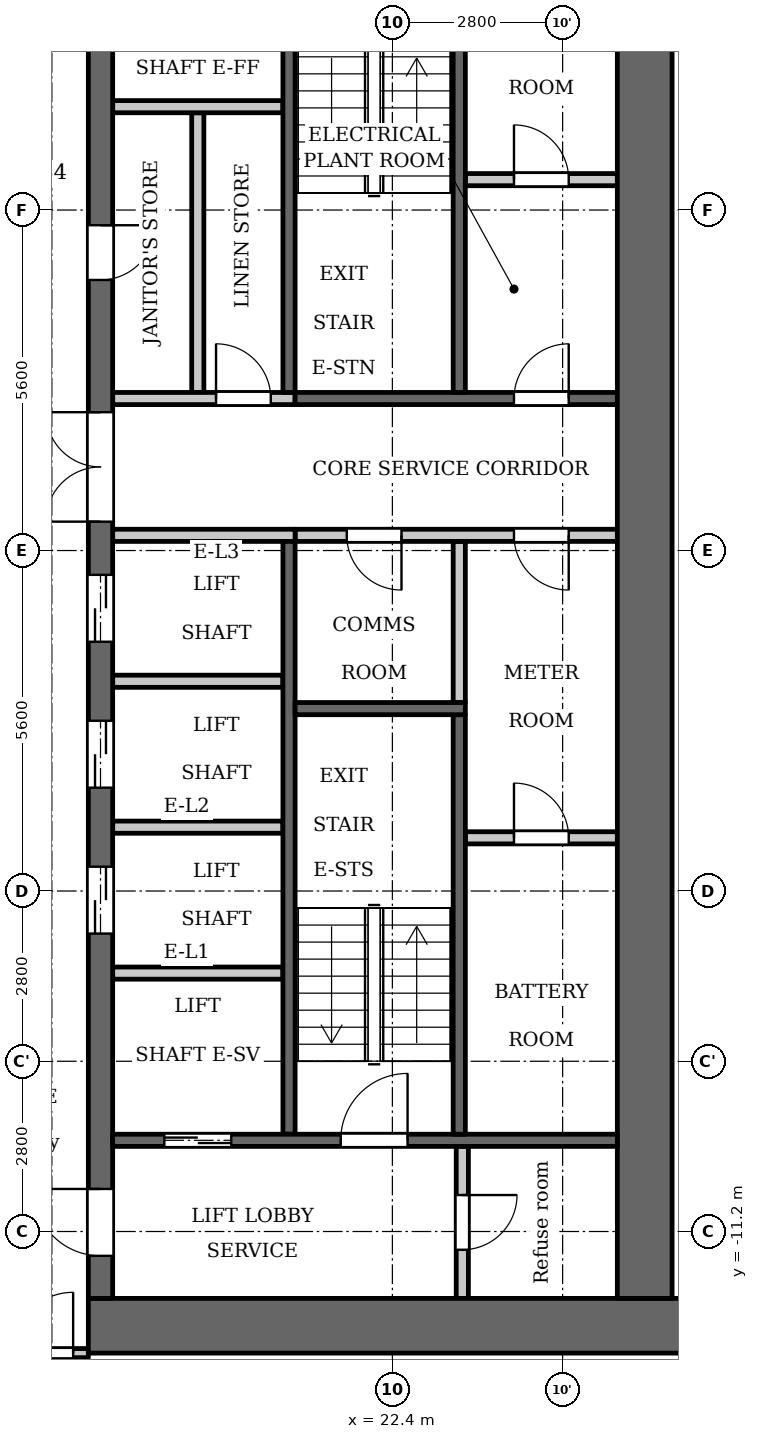
"""IFC4 building model, lengths in metres.
Left out: names, types, materials, properties, quantities, classifications, styles, units other than length and angle.
Written with IfcOpenShell. Run it as: python <this file> out.ifc"""

import sys

from ifc_helpers import new_model, si_unit, direction, frame, frame_2d, origin, place, context, subcontext, project, spatial, rectangle, extrude, element, fill, save


model = new_model("IFC4")
c1 = context("Model", 3, precision=1e-05, world=origin(), true_north=direction((0.0, 1.0)))
c2 = subcontext(c1, "Body", "Model", "MODEL_VIEW")
j1 = project(units=[si_unit("LENGTHUNIT", "METRE"), si_unit("PLANEANGLEUNIT", "RADIAN")], contexts=[c1])
p1 = place(None, origin())
s1 = spatial("IfcSite", under=j1, at=p1, CompositionType="ELEMENT")
p2 = place(p1, origin())
s2 = spatial("IfcBuilding", under=s1, at=p2, CompositionType="ELEMENT")
p3 = place(p2, frame((0.0, 0.0, 118.3)))
s3 = spatial("IfcBuildingStorey", under=s2, at=p3, CompositionType="ELEMENT", Elevation=118.3)
p4 = place(p3, frame((23.5, -2.5, 0.0), z_axis=(0.0, 0.0, 1.0), x_axis=(0.0, 1.0, 0.0)))
e1 = element("IfcWall", 1, at=p4, inside=s3, PredefinedType="PARTITIONING", context=c2, shape_type="SweptSolid", body=[
    extrude(rectangle(XDim=2.65, YDim=0.2, at=frame_2d((1.325, 0.0))), origin(), (0.0, 0.0, 1.0), 3.2),
])
p5 = place(p3, frame((20.7, 2.6, 0.0), z_axis=(0.0, 0.0, 1.0), x_axis=(0.0, 1.0, 0.0)))
e2 = element("IfcWall", 2, at=p5, inside=s3, PredefinedType="SHEAR", context=c2, shape_type="SweptSolid", body=[
    extrude(rectangle(XDim=7.0, YDim=0.2, at=frame_2d((3.5, 0.0))), origin(), (0.0, 0.0, 1.0), 3.2),
])
p6 = place(p3, frame((20.7, -9.6, 0.0), z_axis=(0.0, 0.0, 1.0), x_axis=(0.0, 1.0, 0.0)))
e3 = element("IfcWall", 3, at=p6, inside=s3, PredefinedType="SHEAR", context=c2, shape_type="SweptSolid", body=[
    extrude(rectangle(XDim=9.75, YDim=0.2, at=frame_2d((4.875, 0.0))), origin(), (0.0, 0.0, 1.0), 3.2),
])
p7 = place(p3, frame((20.8, 2.5, 0.0), z_axis=(0.0, 0.0, 1.0), x_axis=(1.0, 0.0, 0.0)))
e4 = element("IfcWall", 4, at=p7, inside=s3, PredefinedType="SHEAR", context=c2, shape_type="SweptSolid", body=[
    extrude(rectangle(XDim=5.3, YDim=0.2, at=frame_2d((2.65, 0.0))), origin(), (0.0, 0.0, 1.0), 3.2),
])
p8 = place(p7, frame((3.6, 0.0, 0.0)))
e5 = element("IfcOpeningElement", 5, at=p8, cuts=e4, PredefinedType="OPENING", context=c2, shape_type="SweptSolid", body=[
    extrude(rectangle(XDim=0.9, YDim=2.1, at=frame_2d((0.45, 1.05))), frame((0.0, 0.11, 0.0), z_axis=(0.0, -1.0, 0.0), x_axis=(1.0, 0.0, 0.0)), (0.0, 0.0, 1.0), 0.22),
])
p9 = place(p3, frame((20.8, 0.25, 0.0), z_axis=(0.0, 0.0, 1.0), x_axis=(1.0, 0.0, 0.0)))
e6 = element("IfcWall", 6, at=p9, inside=s3, PredefinedType="PARTITIONING", context=c2, shape_type="SweptSolid", body=[
    extrude(rectangle(XDim=5.3, YDim=0.2, at=frame_2d((2.65, 0.0))), origin(), (0.0, 0.0, 1.0), 3.2),
])
p10 = place(p9, frame((0.85, 0.0, 0.0)))
e7 = element("IfcOpeningElement", 7, at=p10, cuts=e6, PredefinedType="OPENING", context=c2, shape_type="SweptSolid", body=[
    extrude(rectangle(XDim=0.9, YDim=2.1, at=frame_2d((0.45, 1.05))), frame((0.0, 0.11, 0.0), z_axis=(0.0, -1.0, 0.0), x_axis=(1.0, 0.0, 0.0)), (0.0, 0.0, 1.0), 0.22),
])
p11 = place(p9, frame((3.6, 0.0, 0.0)))
e8 = element("IfcOpeningElement", 8, at=p11, cuts=e6, PredefinedType="OPENING", context=c2, shape_type="SweptSolid", body=[
    extrude(rectangle(XDim=0.9, YDim=2.1, at=frame_2d((0.45, 1.05))), frame((0.0, 0.11, 0.0), z_axis=(0.0, -1.0, 0.0), x_axis=(1.0, 0.0, 0.0)), (0.0, 0.0, 1.0), 0.22),
])
p12 = place(p3, frame((17.4, -12.75, 0.0), z_axis=(0.0, 0.0, 1.0), x_axis=(1.0, 0.0, 0.0)))
e9 = element("IfcWall", 9, at=p12, inside=s3, PredefinedType="SHEAR", context=c2, shape_type="SweptSolid", body=[
    extrude(rectangle(XDim=10.4, YDim=0.9, at=frame_2d((5.2, 0.0))), origin(), (0.0, 0.0, 1.0), 3.2),
])
p13 = place(p3, frame((19.2, 2.6, 0.0), z_axis=(0.0, 0.0, 1.0), x_axis=(0.0, 1.0, 0.0)))
e10 = element("IfcWall", 10, at=p13, inside=s3, PredefinedType="PARTITIONING", context=c2, shape_type="SweptSolid", body=[
    extrude(rectangle(XDim=4.6, YDim=0.2, at=frame_2d((2.3, 0.0))), origin(), (0.0, 0.0, 1.0), 3.2),
])
p14 = place(p3, frame((17.6, -12.3, 0.0), z_axis=(0.0, 0.0, 1.0), x_axis=(0.0, 1.0, 0.0)))
e11 = element("IfcWall", 11, at=p14, inside=s3, PredefinedType="SHEAR", context=c2, shape_type="SweptSolid", body=[
    extrude(rectangle(XDim=24.6, YDim=0.4, at=frame_2d((12.3, 0.0))), origin(), (0.0, 0.0, 1.0), 3.2),
])
p15 = place(p14, frame((6.0, 0.0, 0.0)))
e12 = element("IfcOpeningElement", 12, at=p15, cuts=e11, PredefinedType="OPENING", context=c2, shape_type="SweptSolid", body=[
    extrude(rectangle(XDim=1.1, YDim=2.1, at=frame_2d((0.55, 1.05))), frame((0.0, 0.21, 0.0), z_axis=(0.0, -1.0, 0.0), x_axis=(1.0, 0.0, 0.0)), (0.0, 0.0, 1.0), 0.42),
])
p16 = place(p14, frame((8.4, 0.0, 0.0)))
e13 = element("IfcOpeningElement", 13, at=p16, cuts=e11, PredefinedType="OPENING", context=c2, shape_type="SweptSolid", body=[
    extrude(rectangle(XDim=1.1, YDim=2.1, at=frame_2d((0.55, 1.05))), frame((0.0, 0.21, 0.0), z_axis=(0.0, -1.0, 0.0), x_axis=(1.0, 0.0, 0.0)), (0.0, 0.0, 1.0), 0.42),
])
p17 = place(p14, frame((10.8, 0.0, 0.0)))
e14 = element("IfcOpeningElement", 14, at=p17, cuts=e11, PredefinedType="OPENING", context=c2, shape_type="SweptSolid", body=[
    extrude(rectangle(XDim=1.1, YDim=2.1, at=frame_2d((0.55, 1.05))), frame((0.0, 0.21, 0.0), z_axis=(0.0, -1.0, 0.0), x_axis=(1.0, 0.0, 0.0)), (0.0, 0.0, 1.0), 0.42),
])
p18 = place(p14, frame((16.75, 0.0, 0.0)))
e15 = element("IfcOpeningElement", 15, at=p18, cuts=e11, PredefinedType="OPENING", context=c2, shape_type="SweptSolid", body=[
    extrude(rectangle(XDim=0.9, YDim=2.1, at=frame_2d((0.45, 1.05))), frame((0.0, 0.21, 0.0), z_axis=(0.0, -1.0, 0.0), x_axis=(1.0, 0.0, 0.0)), (0.0, 0.0, 1.0), 0.42),
])
p19 = place(p14, frame((22.8, 0.0, 0.0)))
e16 = element("IfcOpeningElement", 16, at=p19, cuts=e11, PredefinedType="OPENING", context=c2, shape_type="SweptSolid", body=[
    extrude(rectangle(XDim=1.1, YDim=2.1, at=frame_2d((0.55, 1.05))), frame((0.0, 0.21, 0.0), z_axis=(0.0, -1.0, 0.0), x_axis=(1.0, 0.0, 0.0)), (0.0, 0.0, 1.0), 0.42),
])
p20 = place(p14, frame((0.7, 0.0, 0.0)))
e17 = element("IfcOpeningElement", 17, at=p20, cuts=e11, PredefinedType="OPENING", context=c2, shape_type="SweptSolid", body=[
    extrude(rectangle(XDim=1.1, YDim=2.1, at=frame_2d((0.55, 1.05))), frame((0.0, 0.21, 0.0), z_axis=(0.0, -1.0, 0.0), x_axis=(1.0, 0.0, 0.0)), (0.0, 0.0, 1.0), 0.42),
])
p21 = place(p14, frame((12.775, 0.0, 0.0)))
e18 = element("IfcOpeningElement", 18, at=p21, cuts=e11, PredefinedType="OPENING", context=c2, shape_type="SweptSolid", body=[
    extrude(rectangle(XDim=1.8, YDim=2.1, at=frame_2d((0.9, 1.05))), frame((0.0, 0.21, 0.0), z_axis=(0.0, -1.0, 0.0), x_axis=(1.0, 0.0, 0.0)), (0.0, 0.0, 1.0), 0.42),
])
p22 = place(p3, frame((26.55, -12.3, 0.0), z_axis=(0.0, 0.0, 1.0), x_axis=(0.0, 1.0, 0.0)))
e19 = element("IfcWall", 19, at=p22, inside=s3, PredefinedType="SHEAR", context=c2, shape_type="SweptSolid", body=[
    extrude(rectangle(XDim=24.6, YDim=0.9, at=frame_2d((12.3, 0.0))), origin(), (0.0, 0.0, 1.0), 3.2),
])
p23 = place(p3, frame((23.55, -12.3, 0.0), z_axis=(0.0, 0.0, 1.0), x_axis=(0.0, 1.0, 0.0)))
e20 = element("IfcWall", 20, at=p23, inside=s3, PredefinedType="PARTITIONING", context=c2, shape_type="SweptSolid", body=[
    extrude(rectangle(XDim=2.5, YDim=0.2, at=frame_2d((1.25, 0.0))), origin(), (0.0, 0.0, 1.0), 3.2),
])
p24 = place(p23, frame((0.8, 0.0, 0.0)))
e21 = element("IfcOpeningElement", 21, at=p24, cuts=e20, PredefinedType="OPENING", context=c2, shape_type="SweptSolid", body=[
    extrude(rectangle(XDim=0.9, YDim=2.1, at=frame_2d((0.45, 1.05))), frame((0.0, 0.11, 0.0), z_axis=(0.0, -1.0, 0.0), x_axis=(1.0, 0.0, 0.0)), (0.0, 0.0, 1.0), 0.22),
])
p25 = place(p3, frame((23.6, -4.725, 0.0), z_axis=(0.0, 0.0, 1.0), x_axis=(1.0, 0.0, 0.0)))
e22 = element("IfcWall", 22, at=p25, inside=s3, PredefinedType="PARTITIONING", context=c2, shape_type="SweptSolid", body=[
    extrude(rectangle(XDim=2.5, YDim=0.2, at=frame_2d((1.25, 0.0))), origin(), (0.0, 0.0, 1.0), 3.2),
])
p26 = place(p25, frame((0.8, 0.0, 0.0)))
e23 = element("IfcOpeningElement", 23, at=p26, cuts=e22, PredefinedType="OPENING", context=c2, shape_type="SweptSolid", body=[
    extrude(rectangle(XDim=0.9, YDim=2.1, at=frame_2d((0.45, 1.05))), frame((0.0, 0.11, 0.0), z_axis=(0.0, -1.0, 0.0), x_axis=(1.0, 0.0, 0.0)), (0.0, 0.0, 1.0), 0.22),
])
p27 = place(p3, frame((23.6, 6.1, 0.0), z_axis=(0.0, 0.0, 1.0), x_axis=(1.0, 0.0, 0.0)))
e24 = element("IfcWall", 24, at=p27, inside=s3, PredefinedType="PARTITIONING", context=c2, shape_type="SweptSolid", body=[
    extrude(rectangle(XDim=2.5, YDim=0.2, at=frame_2d((1.25, 0.0))), origin(), (0.0, 0.0, 1.0), 3.2),
])
p28 = place(p27, frame((0.8, 0.0, 0.0)))
e25 = element("IfcOpeningElement", 25, at=p28, cuts=e24, PredefinedType="OPENING", context=c2, shape_type="SweptSolid", body=[
    extrude(rectangle(XDim=0.9, YDim=2.1, at=frame_2d((0.45, 1.05))), frame((0.0, 0.11, 0.0), z_axis=(0.0, -1.0, 0.0), x_axis=(1.0, 0.0, 0.0)), (0.0, 0.0, 1.0), 0.22),
])
p29 = place(p3, frame((17.8, -9.7, 0.0), z_axis=(0.0, 0.0, 1.0), x_axis=(1.0, 0.0, 0.0)))
e26 = element("IfcWall", 26, at=p29, inside=s3, PredefinedType="SHEAR", context=c2, shape_type="SweptSolid", body=[
    extrude(rectangle(XDim=8.3, YDim=0.2, at=frame_2d((4.15, 0.0))), origin(), (0.0, 0.0, 1.0), 3.2),
])
p30 = place(p29, frame((0.85, 0.0, 0.0)))
e27 = element("IfcOpeningElement", 27, at=p30, cuts=e26, PredefinedType="OPENING", context=c2, shape_type="SweptSolid", body=[
    extrude(rectangle(XDim=1.1, YDim=2.1, at=frame_2d((0.55, 1.05))), frame((0.0, 0.11, 0.0), z_axis=(0.0, -1.0, 0.0), x_axis=(1.0, 0.0, 0.0)), (0.0, 0.0, 1.0), 0.22),
])
p31 = place(p29, frame((3.75, 0.0, 0.0)))
e28 = element("IfcOpeningElement", 28, at=p31, cuts=e26, PredefinedType="OPENING", context=c2, shape_type="SweptSolid", body=[
    extrude(rectangle(XDim=1.1, YDim=2.1, at=frame_2d((0.55, 1.05))), frame((0.0, 0.11, 0.0), z_axis=(0.0, -1.0, 0.0), x_axis=(1.0, 0.0, 0.0)), (0.0, 0.0, 1.0), 0.22),
])
for number, where, z_axis, x_axis in (
    (29, (17.8, -6.95, 0.0), (0.0, 0.0, 1.0), (1.0, 0.0, 0.0)),
    (30, (17.8, -4.55, 0.0), (0.0, 0.0, 1.0), (1.0, 0.0, 0.0)),
    (31, (17.8, -2.15, 0.0), (0.0, 0.0, 1.0), (1.0, 0.0, 0.0)),
):
    element("IfcWall", number, at=place(p3, frame(where, z_axis=z_axis, x_axis=x_axis)), inside=s3, PredefinedType="PARTITIONING", context=c2, shape_type="SweptSolid", body=[
        extrude(rectangle(XDim=2.8, YDim=0.2, at=frame_2d((1.4, 0.0))), origin(), (0.0, 0.0, 1.0), 3.2),
    ])
p32 = place(p3, frame((17.8, 0.25, 0.0), z_axis=(0.0, 0.0, 1.0), x_axis=(1.0, 0.0, 0.0)))
e32 = element("IfcWall", 32, at=p32, inside=s3, PredefinedType="PARTITIONING", context=c2, shape_type="SweptSolid", body=[
    extrude(rectangle(XDim=3.0, YDim=0.2, at=frame_2d((1.5, 0.0))), origin(), (0.0, 0.0, 1.0), 3.2),
])
p33 = place(p3, frame((17.8, 2.5, 0.0), z_axis=(0.0, 0.0, 1.0), x_axis=(1.0, 0.0, 0.0)))
e33 = element("IfcWall", 33, at=p33, inside=s3, PredefinedType="PARTITIONING", context=c2, shape_type="SweptSolid", body=[
    extrude(rectangle(XDim=3.0, YDim=0.2, at=frame_2d((1.5, 0.0))), origin(), (0.0, 0.0, 1.0), 3.2),
])
p34 = place(p33, frame((1.7, 0.0, 0.0)))
e34 = element("IfcOpeningElement", 34, at=p34, cuts=e33, PredefinedType="OPENING", context=c2, shape_type="SweptSolid", body=[
    extrude(rectangle(XDim=0.9, YDim=2.1, at=frame_2d((0.45, 1.05))), frame((0.0, 0.11, 0.0), z_axis=(0.0, -1.0, 0.0), x_axis=(1.0, 0.0, 0.0)), (0.0, 0.0, 1.0), 0.22),
])
p35 = place(p3, frame((17.8, 7.3, 0.0), z_axis=(0.0, 0.0, 1.0), x_axis=(1.0, 0.0, 0.0)))
e35 = element("IfcWall", 35, at=p35, inside=s3, PredefinedType="PARTITIONING", context=c2, shape_type="SweptSolid", body=[
    extrude(rectangle(XDim=2.8, YDim=0.2, at=frame_2d((1.4, 0.0))), origin(), (0.0, 0.0, 1.0), 3.2),
])
p36 = place(p3, frame((23.5, 2.6, 0.0), z_axis=(0.0, 0.0, 1.0), x_axis=(0.0, 1.0, 0.0)))
e36 = element("IfcWall", 36, at=p36, inside=s3, PredefinedType="SHEAR", context=c2, shape_type="SweptSolid", body=[
    extrude(rectangle(XDim=7.0, YDim=0.2, at=frame_2d((3.5, 0.0))), origin(), (0.0, 0.0, 1.0), 3.2),
])
p37 = place(p3, frame((23.5, -9.6, 0.0), z_axis=(0.0, 0.0, 1.0), x_axis=(0.0, 1.0, 0.0)))
e37 = element("IfcWall", 37, at=p37, inside=s3, PredefinedType="SHEAR", context=c2, shape_type="SweptSolid", body=[
    extrude(rectangle(XDim=6.9, YDim=0.2, at=frame_2d((3.45, 0.0))), origin(), (0.0, 0.0, 1.0), 3.2),
])
p38 = place(p3, frame((20.8, -2.6, 0.0), z_axis=(0.0, 0.0, 1.0), x_axis=(1.0, 0.0, 0.0)))
e38 = element("IfcWall", 38, at=p38, inside=s3, PredefinedType="SHEAR", context=c2, shape_type="SweptSolid", body=[
    extrude(rectangle(XDim=2.8, YDim=0.2, at=frame_2d((1.4, 0.0))), origin(), (0.0, 0.0, 1.0), 3.2),
])
p39 = place(p3, frame((-17.4, -13.2, 0.0), z_axis=(0.0, 0.0, 1.0), x_axis=(1.0, 0.0, 0.0)))
e39 = element("IfcWall", 39, at=p39, inside=s3, PredefinedType="PARTITIONING", context=c2, shape_type="SweptSolid", body=[
    extrude(rectangle(XDim=34.8, YDim=0.15, at=frame_2d((17.4, 0.0))), origin(), (0.0, 0.0, 1.0), 3.2),
])
p40 = place(p39, frame((0.15, 0.0, 0.0)))
e40 = element("IfcOpeningElement", 40, at=p40, cuts=e39, PredefinedType="OPENING", context=c2, shape_type="SweptSolid", body=[
    extrude(rectangle(XDim=1.0, YDim=2.1, at=frame_2d((0.5, 1.05))), frame((0.0, 0.085, 0.0), z_axis=(0.0, -1.0, 0.0), x_axis=(1.0, 0.0, 0.0)), (0.0, 0.0, 1.0), 0.17),
])
p41 = place(p39, frame((33.55, 0.0, 0.0)))
e41 = element("IfcOpeningElement", 41, at=p41, cuts=e39, PredefinedType="OPENING", context=c2, shape_type="SweptSolid", body=[
    extrude(rectangle(XDim=1.0, YDim=2.1, at=frame_2d((0.5, 1.05))), frame((0.0, 0.085, 0.0), z_axis=(0.0, -1.0, 0.0), x_axis=(1.0, 0.0, 0.0)), (0.0, 0.0, 1.0), 0.17),
])
p42 = place(p39, frame((10.1, 0.0, 0.0)))
e42 = element("IfcOpeningElement", 42, at=p42, cuts=e39, PredefinedType="OPENING", context=c2, shape_type="SweptSolid", body=[
    extrude(rectangle(XDim=1.0, YDim=2.1, at=frame_2d((0.5, 1.05))), frame((0.0, 0.085, 0.0), z_axis=(0.0, -1.0, 0.0), x_axis=(1.0, 0.0, 0.0)), (0.0, 0.0, 1.0), 0.17),
])
p43 = place(p39, frame((15.7, 0.0, 0.0)))
e43 = element("IfcOpeningElement", 43, at=p43, cuts=e39, PredefinedType="OPENING", context=c2, shape_type="SweptSolid", body=[
    extrude(rectangle(XDim=1.0, YDim=2.1, at=frame_2d((0.5, 1.05))), frame((0.0, 0.085, 0.0), z_axis=(0.0, -1.0, 0.0), x_axis=(1.0, 0.0, 0.0)), (0.0, 0.0, 1.0), 0.17),
])
p44 = place(p39, frame((24.9, 0.0, 0.0)))
e44 = element("IfcOpeningElement", 44, at=p44, cuts=e39, PredefinedType="OPENING", context=c2, shape_type="SweptSolid", body=[
    extrude(rectangle(XDim=1.0, YDim=2.1, at=frame_2d((0.5, 1.05))), frame((0.0, 0.085, 0.0), z_axis=(0.0, -1.0, 0.0), x_axis=(1.0, 0.0, 0.0)), (0.0, 0.0, 1.0), 0.17),
])
p45 = place(p30, origin())
e45 = element("IfcDoor", 45, at=p45, inside=s3, OperationType="DOUBLE_DOOR_SLIDING", PredefinedType="DOOR", context=c2, shape_type="SweptSolid", body=[
    extrude(rectangle(XDim=1.1, YDim=2.1, at=frame_2d((0.55, 1.05))), frame((0.0, 0.025, 0.0), z_axis=(0.0, -1.0, 0.0), x_axis=(1.0, 0.0, 0.0)), (0.0, 0.0, 1.0), 0.05),
])
fill(e27, e45)
p46 = place(p15, origin())
e46 = element("IfcDoor", 46, at=p46, inside=s3, OperationType="DOUBLE_DOOR_SLIDING", PredefinedType="DOOR", context=c2, shape_type="SweptSolid", body=[
    extrude(rectangle(XDim=1.1, YDim=2.1, at=frame_2d((0.55, 1.05))), frame((0.0, 0.025, 0.0), z_axis=(0.0, -1.0, 0.0), x_axis=(1.0, 0.0, 0.0)), (0.0, 0.0, 1.0), 0.05),
])
fill(e12, e46)
p47 = place(p16, origin())
e47 = element("IfcDoor", 47, at=p47, inside=s3, OperationType="DOUBLE_DOOR_SLIDING", PredefinedType="DOOR", context=c2, shape_type="SweptSolid", body=[
    extrude(rectangle(XDim=1.1, YDim=2.1, at=frame_2d((0.55, 1.05))), frame((0.0, 0.025, 0.0), z_axis=(0.0, -1.0, 0.0), x_axis=(1.0, 0.0, 0.0)), (0.0, 0.0, 1.0), 0.05),
])
fill(e13, e47)
p48 = place(p17, origin())
e48 = element("IfcDoor", 48, at=p48, inside=s3, OperationType="DOUBLE_DOOR_SLIDING", PredefinedType="DOOR", context=c2, shape_type="SweptSolid", body=[
    extrude(rectangle(XDim=1.1, YDim=2.1, at=frame_2d((0.55, 1.05))), frame((0.0, 0.025, 0.0), z_axis=(0.0, -1.0, 0.0), x_axis=(1.0, 0.0, 0.0)), (0.0, 0.0, 1.0), 0.05),
])
fill(e14, e48)
p49 = place(p18, origin())
e49 = element("IfcDoor", 49, at=p49, inside=s3, OperationType="SINGLE_SWING_RIGHT", PredefinedType="DOOR", context=c2, shape_type="SweptSolid", body=[
    extrude(rectangle(XDim=0.9, YDim=2.1, at=frame_2d((0.45, 1.05))), frame((0.0, 0.025, 0.0), z_axis=(0.0, -1.0, 0.0), x_axis=(1.0, 0.0, 0.0)), (0.0, 0.0, 1.0), 0.05),
])
fill(e15, e49)
p50 = place(p34, origin())
e50 = element("IfcDoor", 50, at=p50, inside=s3, OperationType="SINGLE_SWING_RIGHT", PredefinedType="DOOR", context=c2, shape_type="SweptSolid", body=[
    extrude(rectangle(XDim=0.9, YDim=2.1, at=frame_2d((0.45, 1.05))), frame((0.0, 0.025, 0.0), z_axis=(0.0, -1.0, 0.0), x_axis=(1.0, 0.0, 0.0)), (0.0, 0.0, 1.0), 0.05),
])
fill(e34, e50)
p51 = place(p20, origin())
e51 = element("IfcDoor", 51, at=p51, inside=s3, OperationType="SINGLE_SWING_LEFT", PredefinedType="DOOR", context=c2, shape_type="SweptSolid", body=[
    extrude(rectangle(XDim=1.1, YDim=2.1, at=frame_2d((0.55, 1.05))), frame((0.0, 0.025, 0.0), z_axis=(0.0, -1.0, 0.0), x_axis=(1.0, 0.0, 0.0)), (0.0, 0.0, 1.0), 0.05),
])
fill(e17, e51)
p52 = place(p24, origin())
e52 = element("IfcDoor", 52, at=p52, inside=s3, OperationType="SINGLE_SWING_RIGHT", PredefinedType="DOOR", context=c2, shape_type="SweptSolid", body=[
    extrude(rectangle(XDim=0.9, YDim=2.1, at=frame_2d((0.45, 1.05))), frame((0.0, 0.025, 0.0), z_axis=(0.0, -1.0, 0.0), x_axis=(1.0, 0.0, 0.0)), (0.0, 0.0, 1.0), 0.05),
])
fill(e21, e52)
p53 = place(p31, origin())
e53 = element("IfcDoor", 53, at=p53, inside=s3, OperationType="SINGLE_SWING_LEFT", PredefinedType="DOOR", context=c2, shape_type="SweptSolid", body=[
    extrude(rectangle(XDim=1.1, YDim=2.1, at=frame_2d((0.55, 1.05))), frame((0.0, 0.025, 0.0), z_axis=(0.0, -1.0, 0.0), x_axis=(1.0, 0.0, 0.0)), (0.0, 0.0, 1.0), 0.05),
])
fill(e28, e53)
p54 = place(p21, origin())
e54 = element("IfcDoor", 54, at=p54, inside=s3, OperationType="DOUBLE_DOOR_SINGLE_SWING", PredefinedType="DOOR", context=c2, shape_type="SweptSolid", body=[
    extrude(rectangle(XDim=1.8, YDim=2.1, at=frame_2d((0.9, 1.05))), frame((0.0, 0.025, 0.0), z_axis=(0.0, -1.0, 0.0), x_axis=(1.0, 0.0, 0.0)), (0.0, 0.0, 1.0), 0.05),
])
fill(e18, e54)
p55 = place(p10, origin())
e55 = element("IfcDoor", 55, at=p55, inside=s3, OperationType="SINGLE_SWING_RIGHT", PredefinedType="DOOR", context=c2, shape_type="SweptSolid", body=[
    extrude(rectangle(XDim=0.9, YDim=2.1, at=frame_2d((0.45, 1.05))), frame((0.0, 0.025, 0.0), z_axis=(0.0, -1.0, 0.0), x_axis=(1.0, 0.0, 0.0)), (0.0, 0.0, 1.0), 0.05),
])
fill(e7, e55)
p56 = place(p26, origin())
e56 = element("IfcDoor", 56, at=p56, inside=s3, OperationType="SINGLE_SWING_RIGHT", PredefinedType="DOOR", context=c2, shape_type="SweptSolid", body=[
    extrude(rectangle(XDim=0.9, YDim=2.1, at=frame_2d((0.45, 1.05))), frame((0.0, 0.025, 0.0), z_axis=(0.0, -1.0, 0.0), x_axis=(1.0, 0.0, 0.0)), (0.0, 0.0, 1.0), 0.05),
])
fill(e23, e56)
p57 = place(p11, origin())
e57 = element("IfcDoor", 57, at=p57, inside=s3, OperationType="SINGLE_SWING_RIGHT", PredefinedType="DOOR", context=c2, shape_type="SweptSolid", body=[
    extrude(rectangle(XDim=0.9, YDim=2.1, at=frame_2d((0.45, 1.05))), frame((0.0, 0.025, 0.0), z_axis=(0.0, -1.0, 0.0), x_axis=(1.0, 0.0, 0.0)), (0.0, 0.0, 1.0), 0.05),
])
fill(e8, e57)
p58 = place(p28, origin())
e58 = element("IfcDoor", 58, at=p58, inside=s3, OperationType="SINGLE_SWING_RIGHT", PredefinedType="DOOR", context=c2, shape_type="SweptSolid", body=[
    extrude(rectangle(XDim=0.9, YDim=2.1, at=frame_2d((0.45, 1.05))), frame((0.0, 0.025, 0.0), z_axis=(0.0, -1.0, 0.0), x_axis=(1.0, 0.0, 0.0)), (0.0, 0.0, 1.0), 0.05),
])
fill(e25, e58)
p59 = place(p8, origin())
e59 = element("IfcDoor", 59, at=p59, inside=s3, OperationType="SINGLE_SWING_LEFT", PredefinedType="DOOR", context=c2, shape_type="SweptSolid", body=[
    extrude(rectangle(XDim=0.9, YDim=2.1, at=frame_2d((0.45, 1.05))), frame((0.0, 0.025, 0.0), z_axis=(0.0, -1.0, 0.0), x_axis=(1.0, 0.0, 0.0)), (0.0, 0.0, 1.0), 0.05),
])
fill(e5, e59)
p60 = place(p41, origin())
e60 = element("IfcDoor", 60, at=p60, inside=s3, OperationType="SINGLE_SWING_LEFT", PredefinedType="DOOR", context=c2, shape_type="SweptSolid", body=[
    extrude(rectangle(XDim=1.0, YDim=2.1, at=frame_2d((0.5, 1.05))), frame((0.0, 0.025, 0.0), z_axis=(0.0, -1.0, 0.0), x_axis=(1.0, 0.0, 0.0)), (0.0, 0.0, 1.0), 0.05),
])
fill(e41, e60)
save(model, sys.argv[1])
